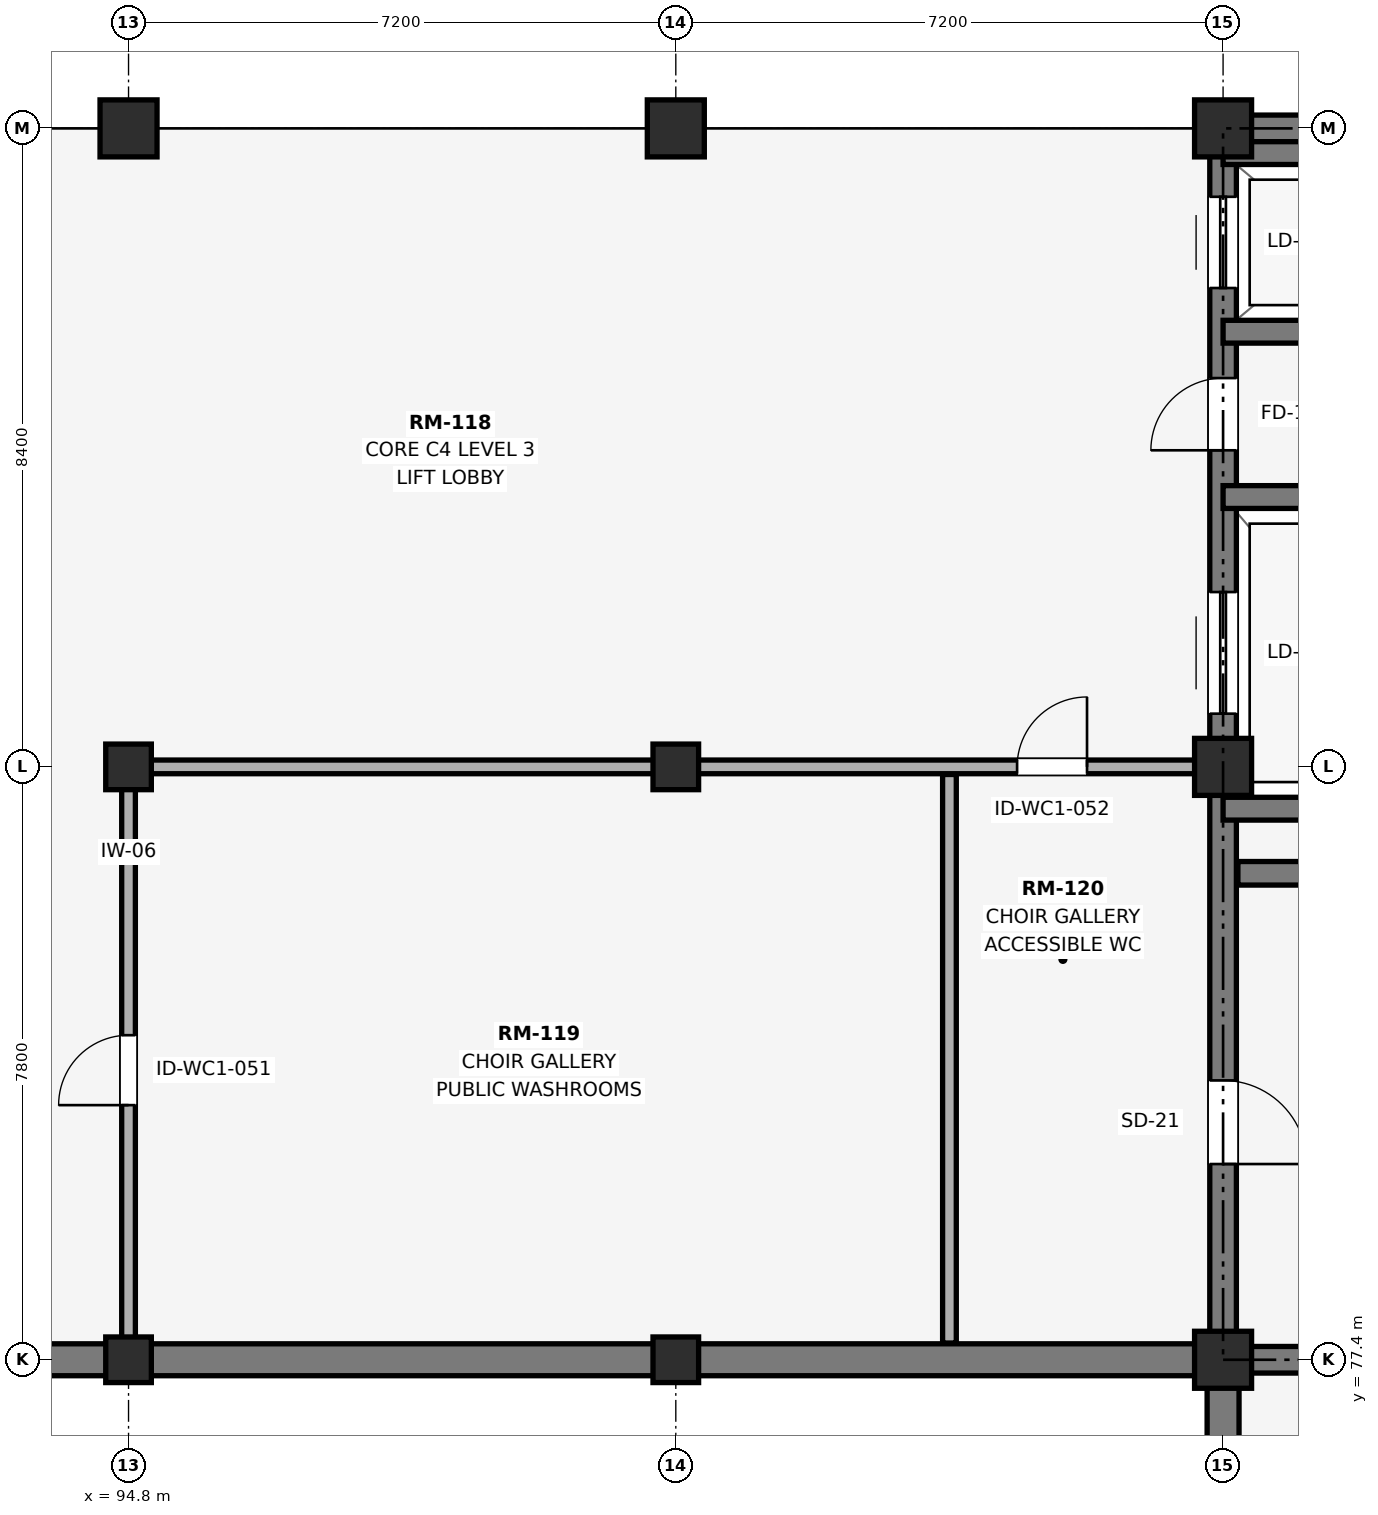
"""IFC4 building model, lengths in metres.
Left out: names, types, materials, properties, quantities, classifications, styles, units other than length and angle.
Written with IfcOpenShell. Run it as: python <this file> out.ifc"""

import sys

from ifc_helpers import new_model, si_unit, direction, frame, frame_2d, origin, origin_2d, place, context, subcontext, project, spatial, rectangle, extrude, element, fill, save


model = new_model("IFC4")
c1 = context("Model", 3, precision=1e-05, world=origin(), true_north=direction((0.0, 1.0)))
c2 = subcontext(c1, "Body", "Model", "MODEL_VIEW")
j1 = project(units=[si_unit("LENGTHUNIT", "METRE"), si_unit("PLANEANGLEUNIT", "RADIAN")], contexts=[c1])
p1 = place(None, origin())
s1 = spatial("IfcSite", under=j1, at=p1, CompositionType="ELEMENT")
p2 = place(p1, origin())
s2 = spatial("IfcBuilding", under=s1, at=p2, CompositionType="ELEMENT")
p3 = place(p2, frame((0.0, 0.0, 15.0)))
s3 = spatial("IfcBuildingStorey", under=s2, at=p3, CompositionType="ELEMENT", Elevation=15.0)
for number, where, z_axis, x_axis in (
    (1, (94.8, 77.4, 0.0), (0.0, 0.0, 1.0), (1.0, 0.0, 0.0)),
    (2, (94.8, 85.2, 0.0), (0.0, 0.0, 1.0), (1.0, 0.0, 0.0)),
):
    element("IfcColumn", number, at=place(p3, frame(where, z_axis=z_axis, x_axis=x_axis)), inside=s3, PredefinedType="COLUMN", context=c2, shape_type="SweptSolid", body=[
        extrude(rectangle(XDim=0.6, YDim=0.6, at=origin_2d()), origin(), (0.0, 0.0, 1.0), 4.5),
    ])
p4 = place(p3, frame((94.8, 93.6, 0.0), z_axis=(0.0, 0.0, 1.0), x_axis=(1.0, 0.0, 0.0)))
e3 = element("IfcColumn", 3, at=p4, inside=s3, PredefinedType="COLUMN", context=c2, shape_type="SweptSolid", body=[
    extrude(rectangle(XDim=0.75, YDim=0.75, at=origin_2d()), origin(), (0.0, 0.0, 1.0), 4.5),
])
for number, where, z_axis, x_axis in (
    (4, (102.0, 77.4, 0.0), (0.0, 0.0, 1.0), (1.0, 0.0, 0.0)),
    (5, (102.0, 85.2, 0.0), (0.0, 0.0, 1.0), (1.0, 0.0, 0.0)),
):
    element("IfcColumn", number, at=place(p3, frame(where, z_axis=z_axis, x_axis=x_axis)), inside=s3, PredefinedType="COLUMN", context=c2, shape_type="SweptSolid", body=[
        extrude(rectangle(XDim=0.6, YDim=0.6, at=origin_2d()), origin(), (0.0, 0.0, 1.0), 4.5),
    ])
for number, where, z_axis, x_axis in (
    (6, (102.0, 93.6, 0.0), (0.0, 0.0, 1.0), (1.0, 0.0, 0.0)),
    (7, (109.2, 77.4, 0.0), (0.0, 0.0, 1.0), (1.0, 0.0, 0.0)),
    (8, (109.2, 85.2, 0.0), (0.0, 0.0, 1.0), (1.0, 0.0, 0.0)),
    (9, (109.2, 93.6, 0.0), (0.0, 0.0, 1.0), (1.0, 0.0, 0.0)),
):
    element("IfcColumn", number, at=place(p3, frame(where, z_axis=z_axis, x_axis=x_axis)), inside=s3, PredefinedType="COLUMN", context=c2, shape_type="SweptSolid", body=[
        extrude(rectangle(XDim=0.75, YDim=0.75, at=origin_2d()), origin(), (0.0, 0.0, 1.0), 4.5),
    ])
p5 = place(p3, frame((58.59, 77.4, 0.0), z_axis=(0.0, 0.0, 1.0), x_axis=(1.0, 0.0, 0.0)))
e10 = element("IfcWall", 10, at=p5, inside=s3, PredefinedType="SOLIDWALL", context=c2, shape_type="SweptSolid", body=[
    extrude(rectangle(XDim=50.82, YDim=0.42, at=frame_2d((25.41, 0.0))), origin(), (0.0, 0.0, 1.0), 4.5),
])
p6 = place(p5, frame((9.8, 0.0, 0.0)))
e11 = element("IfcOpeningElement", 11, at=p6, cuts=e10, PredefinedType="OPENING", context=c2, shape_type="SweptSolid", body=[
    extrude(rectangle(XDim=2.0, YDim=2.45, at=frame_2d((1.0, 1.225))), frame((0.0, 0.22, 0.0), z_axis=(0.0, -1.0, 0.0), x_axis=(1.0, 0.0, 0.0)), (0.0, 0.0, 1.0), 0.44),
])
p7 = place(p3, frame((109.2, 46.41, 0.0), z_axis=(0.0, 0.0, 1.0), x_axis=(0.0, 1.0, 0.0)))
e12 = element("IfcWall", 12, at=p7, inside=s3, PredefinedType="SOLIDWALL", context=c2, shape_type="SweptSolid", body=[
    extrude(rectangle(XDim=30.78, YDim=0.42, at=frame_2d((15.39, 0.0))), origin(), (0.0, 0.0, 1.0), 4.5),
])
p8 = place(p3, frame((109.52, 77.4, 0.0), z_axis=(0.0, 0.0, 1.0), x_axis=(1.0, 0.0, 0.0)))
e13 = element("IfcWall", 13, at=p8, inside=s3, PredefinedType="SHEAR", context=c2, shape_type="SweptSolid", body=[
    extrude(rectangle(XDim=9.455, YDim=0.35, at=frame_2d((4.728, 0.0))), origin(), (0.0, 0.0, 1.0), 4.5),
])
p9 = place(p3, frame((109.025, 93.6, 0.0), z_axis=(0.0, 0.0, 1.0), x_axis=(1.0, 0.0, 0.0)))
e14 = element("IfcWall", 14, at=p9, inside=s3, PredefinedType="SHEAR", context=c2, shape_type="SweptSolid", body=[
    extrude(rectangle(XDim=9.95, YDim=0.35, at=frame_2d((4.975, 0.0))), origin(), (0.0, 0.0, 1.0), 4.5),
])
p10 = place(p3, frame((109.2, 77.575, 0.0), z_axis=(0.0, 0.0, 1.0), x_axis=(0.0, 1.0, 0.0)))
e15 = element("IfcWall", 15, at=p10, inside=s3, PredefinedType="SHEAR", context=c2, shape_type="SweptSolid", body=[
    extrude(rectangle(XDim=15.85, YDim=0.35, at=frame_2d((7.925, 0.0))), origin(), (0.0, 0.0, 1.0), 4.5),
])
p11 = place(p10, frame((8.325, 0.0, 0.0)))
e16 = element("IfcOpeningElement", 16, at=p11, cuts=e15, PredefinedType="OPENING", context=c2, shape_type="SweptSolid", body=[
    extrude(rectangle(XDim=1.6, YDim=2.4, at=frame_2d((0.8, 1.2))), frame((0.0, 0.185, 0.0), z_axis=(0.0, -1.0, 0.0), x_axis=(1.0, 0.0, 0.0)), (0.0, 0.0, 1.0), 0.37),
])
p12 = place(p10, frame((13.925, 0.0, 0.0)))
e17 = element("IfcOpeningElement", 17, at=p12, cuts=e15, PredefinedType="OPENING", context=c2, shape_type="SweptSolid", body=[
    extrude(rectangle(XDim=1.2, YDim=2.2, at=frame_2d((0.6, 1.1))), frame((0.0, 0.185, 0.0), z_axis=(0.0, -1.0, 0.0), x_axis=(1.0, 0.0, 0.0)), (0.0, 0.0, 1.0), 0.37),
])
p13 = place(p10, frame((11.79, 0.0, 0.0)))
e18 = element("IfcOpeningElement", 18, at=p13, cuts=e15, PredefinedType="OPENING", context=c2, shape_type="SweptSolid", body=[
    extrude(rectangle(XDim=0.95, YDim=2.1, at=frame_2d((0.475, 1.05))), frame((0.0, 0.185, 0.0), z_axis=(0.0, -1.0, 0.0), x_axis=(1.0, 0.0, 0.0)), (0.0, 0.0, 1.0), 0.37),
])
p14 = place(p10, frame((2.4, 0.0, 0.0)))
e19 = element("IfcOpeningElement", 19, at=p14, cuts=e15, PredefinedType="OPENING", context=c2, shape_type="SweptSolid", body=[
    extrude(rectangle(XDim=1.1, YDim=2.2, at=frame_2d((0.55, 1.1))), frame((0.0, 0.185, 0.0), z_axis=(0.0, -1.0, 0.0), x_axis=(1.0, 0.0, 0.0)), (0.0, 0.0, 1.0), 0.37),
])
p15 = place(p3, frame((109.395, 83.8, 0.0), z_axis=(0.0, 0.0, 1.0), x_axis=(1.0, 0.0, 0.0)))
e20 = element("IfcWall", 20, at=p15, inside=s3, PredefinedType="SHEAR", context=c2, shape_type="SweptSolid", body=[
    extrude(rectangle(XDim=9.21, YDim=0.31, at=frame_2d((4.605, 0.0))), origin(), (0.0, 0.0, 1.0), 4.5),
])
for number, where, z_axis, x_axis in (
    (21, (109.2, 84.65, 0.0), (0.0, 0.0, 1.0), (1.0, 0.0, 0.0)),
    (22, (109.2, 88.75, 0.0), (0.0, 0.0, 1.0), (1.0, 0.0, 0.0)),
):
    element("IfcWall", number, at=place(p3, frame(where, z_axis=z_axis, x_axis=x_axis)), inside=s3, PredefinedType="SHEAR", context=c2, shape_type="SweptSolid", body=[
        extrude(rectangle(XDim=3.5, YDim=0.3, at=frame_2d((1.75, 0.0))), origin(), (0.0, 0.0, 1.0), 5.3),
    ])
for number, where, z_axis, x_axis in (
    (23, (109.2, 90.925, 0.0), (0.0, 0.0, 1.0), (1.0, 0.0, 0.0)),
    (24, (109.2, 93.275, 0.0), (0.0, 0.0, 1.0), (1.0, 0.0, 0.0)),
):
    element("IfcWall", number, at=place(p3, frame(where, z_axis=z_axis, x_axis=x_axis)), inside=s3, PredefinedType="SHEAR", context=c2, shape_type="SweptSolid", body=[
        extrude(rectangle(XDim=2.8, YDim=0.3, at=frame_2d((1.4, 0.0))), origin(), (0.0, 0.0, 1.0), 5.3),
    ])
p16 = place(p3, frame((94.8, 77.55, 0.0), z_axis=(0.0, 0.0, 1.0), x_axis=(0.0, 1.0, 0.0)))
e25 = element("IfcWall", 25, at=p16, inside=s3, PredefinedType="PARTITIONING", context=c2, shape_type="SweptSolid", body=[
    extrude(rectangle(XDim=7.65, YDim=0.18, at=frame_2d((3.825, 0.0))), origin(), (0.0, 0.0, 1.0), 4.19),
])
p17 = place(p16, frame((3.2, 0.0, 0.0)))
e26 = element("IfcOpeningElement", 26, at=p17, cuts=e25, PredefinedType="OPENING", context=c2, shape_type="SweptSolid", body=[
    extrude(rectangle(XDim=0.92, YDim=2.15, at=frame_2d((0.46, 1.075))), frame((0.0, 0.1, 0.0), z_axis=(0.0, -1.0, 0.0), x_axis=(1.0, 0.0, 0.0)), (0.0, 0.0, 1.0), 0.2),
])
p18 = place(p3, frame((94.89, 85.2, 0.0), z_axis=(0.0, 0.0, 1.0), x_axis=(1.0, 0.0, 0.0)))
e27 = element("IfcWall", 27, at=p18, inside=s3, PredefinedType="PARTITIONING", context=c2, shape_type="SweptSolid", body=[
    extrude(rectangle(XDim=14.13, YDim=0.18, at=frame_2d((7.065, 0.0))), origin(), (0.0, 0.0, 1.0), 4.19),
])
p19 = place(p18, frame((11.6, 0.0, 0.0)))
e28 = element("IfcOpeningElement", 28, at=p19, cuts=e27, PredefinedType="OPENING", context=c2, shape_type="SweptSolid", body=[
    extrude(rectangle(XDim=0.92, YDim=2.15, at=frame_2d((0.46, 1.075))), frame((0.0, 0.1, 0.0), z_axis=(0.0, -1.0, 0.0), x_axis=(1.0, 0.0, 0.0)), (0.0, 0.0, 1.0), 0.2),
])
p20 = place(p3, frame((105.6, 77.62, 0.0), z_axis=(0.0, 0.0, 1.0), x_axis=(0.0, 1.0, 0.0)))
e29 = element("IfcWall", 29, at=p20, inside=s3, PredefinedType="PARTITIONING", context=c2, shape_type="SweptSolid", body=[
    extrude(rectangle(XDim=7.48, YDim=0.18, at=frame_2d((3.74, 0.0))), origin(), (0.0, 0.0, 1.0), 4.19),
])
p21 = place(p11, origin())
e30 = element("IfcDoor", 30, at=p21, inside=s3, OperationType="SLIDING_TO_LEFT", PredefinedType="DOOR", context=c2, shape_type="SweptSolid", body=[
    extrude(rectangle(XDim=1.6, YDim=2.4, at=frame_2d((0.8, 1.2))), frame((0.0, 0.025, 0.0), z_axis=(0.0, -1.0, 0.0), x_axis=(1.0, 0.0, 0.0)), (0.0, 0.0, 1.0), 0.05),
])
fill(e16, e30)
p22 = place(p12, origin())
e31 = element("IfcDoor", 31, at=p22, inside=s3, OperationType="SLIDING_TO_RIGHT", PredefinedType="DOOR", context=c2, shape_type="SweptSolid", body=[
    extrude(rectangle(XDim=1.2, YDim=2.2, at=frame_2d((0.6, 1.1))), frame((0.0, 0.025, 0.0), z_axis=(0.0, -1.0, 0.0), x_axis=(1.0, 0.0, 0.0)), (0.0, 0.0, 1.0), 0.05),
])
fill(e17, e31)
p23 = place(p13, origin())
e32 = element("IfcDoor", 32, at=p23, inside=s3, OperationType="SINGLE_SWING_LEFT", PredefinedType="DOOR", context=c2, shape_type="SweptSolid", body=[
    extrude(rectangle(XDim=0.95, YDim=2.1, at=frame_2d((0.475, 1.05))), frame((0.0, 0.025, 0.0), z_axis=(0.0, -1.0, 0.0), x_axis=(1.0, 0.0, 0.0)), (0.0, 0.0, 1.0), 0.05),
])
fill(e18, e32)
p24 = place(p14, frame((1.1, 0.0, 0.0), z_axis=(0.0, 0.0, 1.0), x_axis=(-1.0, 0.0, 0.0)))
e33 = element("IfcDoor", 33, at=p24, inside=s3, OperationType="SINGLE_SWING_LEFT", PredefinedType="DOOR", context=c2, shape_type="SweptSolid", body=[
    extrude(rectangle(XDim=1.1, YDim=2.2, at=frame_2d((0.55, 1.1))), frame((0.0, 0.025, 0.0), z_axis=(0.0, -1.0, 0.0), x_axis=(1.0, 0.0, 0.0)), (0.0, 0.0, 1.0), 0.05),
])
fill(e19, e33)
p25 = place(p17, origin())
e34 = element("IfcDoor", 34, at=p25, inside=s3, OperationType="SINGLE_SWING_LEFT", PredefinedType="DOOR", context=c2, shape_type="SweptSolid", body=[
    extrude(rectangle(XDim=0.92, YDim=2.15, at=frame_2d((0.46, 1.075))), frame((0.0, 0.025, 0.0), z_axis=(0.0, -1.0, 0.0), x_axis=(1.0, 0.0, 0.0)), (0.0, 0.0, 1.0), 0.05),
])
fill(e26, e34)
p26 = place(p19, origin())
e35 = element("IfcDoor", 35, at=p26, inside=s3, OperationType="SINGLE_SWING_RIGHT", PredefinedType="DOOR", context=c2, shape_type="SweptSolid", body=[
    extrude(rectangle(XDim=0.92, YDim=2.15, at=frame_2d((0.46, 1.075))), frame((0.0, 0.025, 0.0), z_axis=(0.0, -1.0, 0.0), x_axis=(1.0, 0.0, 0.0)), (0.0, 0.0, 1.0), 0.05),
])
fill(e28, e35)
save(model, sys.argv[1])
